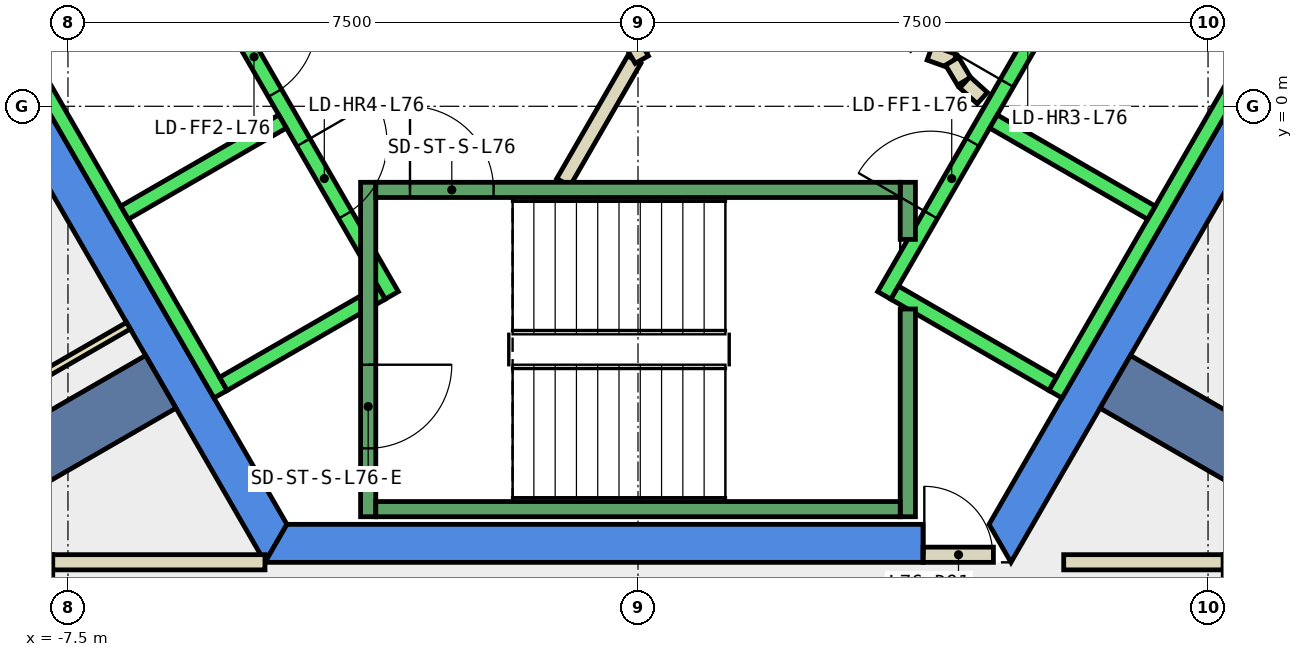
"""IFC4 building model, lengths in metres.
Left out: names, types, materials, properties, quantities, classifications, styles, units other than length and angle.
Written with IfcOpenShell. Run it as: python <this file> out.ifc"""

import sys

from ifc_helpers import new_model, si_unit, direction, frame, frame_2d, origin, place, context, subcontext, project, spatial, polyline, rectangle, outline, extrude, element, fill, save


model = new_model("IFC4")
c1 = context("Model", 3, precision=1e-05, world=origin(), true_north=direction((0.0, 1.0)))
c2 = subcontext(c1, "Body", "Model", "MODEL_VIEW")
j1 = project(units=[si_unit("LENGTHUNIT", "METRE"), si_unit("PLANEANGLEUNIT", "RADIAN")], contexts=[c1])
p1 = place(None, origin())
s1 = spatial("IfcSite", under=j1, at=p1, CompositionType="ELEMENT")
p2 = place(p1, origin())
s2 = spatial("IfcBuilding", under=s1, at=p2, CompositionType="ELEMENT")
p3 = place(p2, frame((0.0, 0.0, 322.4)))
s3 = spatial("IfcBuildingStorey", under=s2, at=p3, CompositionType="ELEMENT", Elevation=322.4)
p4 = place(p3, frame((0.0, 0.0, -0.34)))
e1 = element("IfcWall", 1, at=p4, inside=s3, PredefinedType="SHEAR", context=c2, shape_type="SweptSolid", body=[
    extrude(outline(polyline([(-9.815, 2.5), (-4.907, -6.0), (-4.619, -5.5), (-9.238, 2.5), (-9.815, 2.5)])), origin(), (0.0, 0.0, 1.0), 3.34),
])
p5 = place(p3, frame((0.0, 0.0, -0.34)))
e2 = element("IfcWall", 2, at=p5, inside=s3, PredefinedType="SHEAR", context=c2, shape_type="SweptSolid", body=[
    extrude(outline(polyline([(3.75, -6.0), (3.75, -5.5), (-4.619, -5.5), (-4.907, -6.0), (3.75, -6.0)])), origin(), (0.0, 0.0, 1.0), 3.34),
])
p6 = place(p3, frame((0.0, 0.0, -0.34)))
e3 = element("IfcWall", 3, at=p6, inside=s3, PredefinedType="SHEAR", context=c2, shape_type="SweptSolid", body=[
    extrude(outline(polyline([(4.907, -6.0), (9.815, 2.5), (9.238, 2.5), (4.619, -5.5), (4.907, -6.0)])), origin(), (0.0, 0.0, 1.0), 3.34),
])
for number, where, z_axis, x_axis in (
    (4, (6.279, -3.625, -0.34), (0.0, 0.0, 1.0), (0.866, -0.5, 0.0)),
    (5, (-6.279, -3.625, -0.34), (0.0, 0.0, 1.0), (-0.866, -0.5, 0.0)),
):
    element("IfcWall", number, at=place(p3, frame(where, z_axis=z_axis, x_axis=x_axis)), inside=s3, PredefinedType="SHEAR", context=c2, shape_type="SweptSolid", body=[
        extrude(rectangle(XDim=9.0, YDim=0.8, at=frame_2d((4.5, 0.0))), origin(), (0.0, 0.0, 1.0), 3.34),
    ])
p7 = place(p3, frame((-0.982, -1.0, 0.0), z_axis=(0.0, 0.0, 1.0), x_axis=(0.50024047865, 0.865886518847, 0.0)))
e6 = element("IfcWall", 6, at=p7, inside=s3, PredefinedType="PARTITIONING", context=c2, shape_type="SweptSolid", body=[
    extrude(rectangle(XDim=1.863, YDim=0.2, at=frame_2d((0.931, 0.0))), origin(), (0.0, 0.0, 1.0), 3.0),
])
p8 = place(p3, frame((3.838, 0.702, 0.0), z_axis=(0.0, 0.0, 1.0), x_axis=(0.941035081519, -0.338308993895, 0.0)))
e7 = element("IfcWall", 7, at=p8, inside=s3, PredefinedType="PARTITIONING", context=c2, shape_type="SweptSolid", body=[
    extrude(rectangle(XDim=0.337, YDim=0.2, at=frame_2d((0.168, 0.0))), origin(), (0.0, 0.0, 1.0), 3.0),
])
p9 = place(p3, frame((4.132, 0.593, 0.0), z_axis=(0.0, 0.0, 1.0), x_axis=(0.513561617048, -0.858052717201, 0.0)))
e8 = element("IfcWall", 8, at=p9, inside=s3, PredefinedType="PARTITIONING", context=c2, shape_type="SweptSolid", body=[
    extrude(rectangle(XDim=0.308, YDim=0.2, at=frame_2d((0.154, 0.0))), origin(), (0.0, 0.0, 1.0), 3.0),
])
p10 = place(p3, frame((4.301, 0.315, 0.0), z_axis=(0.0, 0.0, 1.0), x_axis=(0.741798017506, -0.670623367639, 0.0)))
e9 = element("IfcWall", 9, at=p10, inside=s3, PredefinedType="PARTITIONING", context=c2, shape_type="SweptSolid", body=[
    extrude(rectangle(XDim=0.309, YDim=0.2, at=frame_2d((0.154, 0.0))), origin(), (0.0, 0.0, 1.0), 3.0),
])
p11 = place(p3, frame((-2.54, 5.1, 0.0), z_axis=(0.0, 0.0, 1.0), x_axis=(0.499925051871, -0.866068670783, 0.0)))
e10 = element("IfcWall", 10, at=p11, inside=s3, PredefinedType="PARTITIONING", context=c2, shape_type="SweptSolid", body=[
    extrude(rectangle(XDim=5.181, YDim=0.2, at=frame_2d((2.59, 0.0))), origin(), (0.0, 0.0, 1.0), 3.0),
])
p12 = place(p11, frame((2.04, 0.0, 0.0)))
e11 = element("IfcOpeningElement", 11, at=p12, cuts=e10, PredefinedType="OPENING", context=c2, shape_type="SweptSolid", body=[
    extrude(rectangle(XDim=1.0, YDim=2.1, at=frame_2d((0.5, 1.05))), frame((0.0, 0.11, 0.0), z_axis=(0.0, -1.0, 0.0), x_axis=(1.0, 0.0, 0.0)), (0.0, 0.0, 1.0), 0.22),
])
p13 = place(p3, frame((5.601, -5.999, 0.0), z_axis=(0.0, 0.0, 1.0), x_axis=(1.0, 0.0, 0.0)))
e12 = element("IfcWall", 12, at=p13, inside=s3, PredefinedType="PARTITIONING", context=c2, shape_type="SweptSolid", body=[
    extrude(rectangle(XDim=2.099, YDim=0.2, at=frame_2d((1.049, 0.0))), origin(), (0.0, 0.0, 1.0), 3.0),
])
for number, where, z_axis, x_axis in (
    (13, (7.8, -5.899, 0.0), (0.0, 0.0, 1.0), (0.0, -1.0, 0.0)),
    (14, (-7.8, -11.624, 0.0), (0.0, 0.0, 1.0), (0.0, 1.0, 0.0)),
):
    element("IfcWall", number, at=place(p3, frame(where, z_axis=z_axis, x_axis=x_axis)), inside=s3, PredefinedType="PARTITIONING", context=c2, shape_type="SweptSolid", body=[
        extrude(rectangle(XDim=5.725, YDim=0.2, at=frame_2d((2.863, 0.0))), origin(), (0.0, 0.0, 1.0), 3.0),
    ])
p14 = place(p3, frame((-7.7, -5.999, 0.0), z_axis=(0.0, 0.0, 1.0), x_axis=(1.0, 0.0, 0.0)))
e15 = element("IfcWall", 15, at=p14, inside=s3, PredefinedType="PARTITIONING", context=c2, shape_type="SweptSolid", body=[
    extrude(rectangle(XDim=2.792, YDim=0.2, at=frame_2d((1.396, 0.0))), origin(), (0.0, 0.0, 1.0), 3.0),
])
p15 = place(p3, frame((-6.705, -2.887, 0.0), z_axis=(0.0, 0.0, 1.0), x_axis=(-0.866001397039, -0.500041578597, 0.0)))
e16 = element("IfcWall", 16, at=p15, inside=s3, PredefinedType="PARTITIONING", context=c2, shape_type="SweptSolid", body=[
    extrude(rectangle(XDim=6.998, YDim=0.1, at=frame_2d((3.499, 0.0))), origin(), (0.0, 0.0, 1.0), 3.0),
])
p16 = place(p3, frame((3.75, -5.9, 0.0), z_axis=(0.0, 0.0, 1.0), x_axis=(1.0, 0.0, 0.0)))
e17 = element("IfcWall", 17, at=p16, inside=s3, PredefinedType="PARTITIONING", context=c2, shape_type="SweptSolid", body=[
    extrude(rectangle(XDim=0.926, YDim=0.2, at=frame_2d((0.463, 0.0))), origin(), (0.0, 0.0, 1.0), 2.4),
])
p17 = place(p16, frame((0.017, 0.0, 0.0)))
e18 = element("IfcOpeningElement", 18, at=p17, cuts=e17, PredefinedType="OPENING", context=c2, shape_type="SweptSolid", body=[
    extrude(rectangle(XDim=0.9, YDim=2.1, at=frame_2d((0.45, 1.05))), frame((0.0, 0.11, 0.0), z_axis=(0.0, -1.0, 0.0), x_axis=(1.0, 0.0, 0.0)), (0.0, 0.0, 1.0), 0.22),
])
p18 = place(p3, frame((-5.94, 2.188, 0.0), z_axis=(0.0, 0.0, 1.0), x_axis=(0.500034260056, -0.866005622828, 0.0)))
e19 = element("IfcWall", 19, at=p18, inside=s3, PredefinedType="STANDARD", context=c2, shape_type="SweptSolid", body=[
    extrude(rectangle(XDim=5.399, YDim=0.2, at=frame_2d((2.7, 0.0))), origin(), (0.0, 0.0, 1.0), 3.0),
])
p19 = place(p18, frame((3.075, 0.0, 0.0)))
e20 = element("IfcOpeningElement", 20, at=p19, cuts=e19, PredefinedType="OPENING", context=c2, shape_type="SweptSolid", body=[
    extrude(rectangle(XDim=1.1, YDim=2.1, at=frame_2d((0.55, 1.05))), frame((0.0, 0.11, 0.0), z_axis=(0.0, -1.0, 0.0), x_axis=(1.0, 0.0, 0.0)), (0.0, 0.0, 1.0), 0.22),
])
p20 = place(p18, frame((1.225, 0.0, 0.0)))
e21 = element("IfcOpeningElement", 21, at=p20, cuts=e19, PredefinedType="OPENING", context=c2, shape_type="SweptSolid", body=[
    extrude(rectangle(XDim=1.1, YDim=2.1, at=frame_2d((0.55, 1.05))), frame((0.0, 0.11, 0.0), z_axis=(0.0, -1.0, 0.0), x_axis=(1.0, 0.0, 0.0)), (0.0, 0.0, 1.0), 0.22),
])
p21 = place(p3, frame((-8.192, 0.888, 0.0), z_axis=(0.0, 0.0, 1.0), x_axis=(0.500034260056, -0.866005622828, 0.0)))
e22 = element("IfcWall", 22, at=p21, inside=s3, PredefinedType="STANDARD", context=c2, shape_type="SweptSolid", body=[
    extrude(rectangle(XDim=5.399, YDim=0.2, at=frame_2d((2.7, 0.0))), origin(), (0.0, 0.0, 1.0), 3.0),
])
p22 = place(p3, frame((-4.677, -0.2, 0.0), z_axis=(0.0, 0.0, 1.0), x_axis=(-0.865973769406, -0.500089422704, 0.0)))
e23 = element("IfcWall", 23, at=p22, inside=s3, PredefinedType="STANDARD", context=c2, shape_type="SweptSolid", body=[
    extrude(rectangle(XDim=2.399, YDim=0.2, at=frame_2d((1.2, 0.0))), origin(), (0.0, 0.0, 1.0), 3.0),
])
p23 = place(p3, frame((-3.377, -2.452, 0.0), z_axis=(0.0, 0.0, 1.0), x_axis=(-0.865955154139, -0.50012165622, 0.0)))
e24 = element("IfcWall", 24, at=p23, inside=s3, PredefinedType="STANDARD", context=c2, shape_type="SweptSolid", body=[
    extrude(rectangle(XDim=2.4, YDim=0.2, at=frame_2d((1.2, 0.0))), origin(), (0.0, 0.0, 1.0), 3.0),
])
p24 = place(p3, frame((3.24, -2.488, 0.0), z_axis=(0.0, 0.0, 1.0), x_axis=(0.500034260056, 0.866005622828, 0.0)))
e25 = element("IfcWall", 25, at=p24, inside=s3, PredefinedType="STANDARD", context=c2, shape_type="SweptSolid", body=[
    extrude(rectangle(XDim=5.399, YDim=0.2, at=frame_2d((2.7, 0.0))), origin(), (0.0, 0.0, 1.0), 3.0),
])
p25 = place(p24, frame((3.225, 0.0, 0.0)))
e26 = element("IfcOpeningElement", 26, at=p25, cuts=e25, PredefinedType="OPENING", context=c2, shape_type="SweptSolid", body=[
    extrude(rectangle(XDim=1.1, YDim=2.1, at=frame_2d((0.55, 1.05))), frame((0.0, 0.11, 0.0), z_axis=(0.0, -1.0, 0.0), x_axis=(1.0, 0.0, 0.0)), (0.0, 0.0, 1.0), 0.22),
])
p26 = place(p24, frame((1.225, 0.0, 0.0)))
e27 = element("IfcOpeningElement", 27, at=p26, cuts=e25, PredefinedType="OPENING", context=c2, shape_type="SweptSolid", body=[
    extrude(rectangle(XDim=1.1, YDim=2.1, at=frame_2d((0.55, 1.05))), frame((0.0, 0.11, 0.0), z_axis=(0.0, -1.0, 0.0), x_axis=(1.0, 0.0, 0.0)), (0.0, 0.0, 1.0), 0.22),
])
p27 = place(p3, frame((5.492, -3.788, 0.0), z_axis=(0.0, 0.0, 1.0), x_axis=(0.500034260056, 0.866005622828, 0.0)))
e28 = element("IfcWall", 28, at=p27, inside=s3, PredefinedType="STANDARD", context=c2, shape_type="SweptSolid", body=[
    extrude(rectangle(XDim=5.399, YDim=0.2, at=frame_2d((2.7, 0.0))), origin(), (0.0, 0.0, 1.0), 3.0),
])
p28 = place(p3, frame((3.377, -2.452, 0.0), z_axis=(0.0, 0.0, 1.0), x_axis=(0.865955154139, -0.50012165622, 0.0)))
e29 = element("IfcWall", 29, at=p28, inside=s3, PredefinedType="STANDARD", context=c2, shape_type="SweptSolid", body=[
    extrude(rectangle(XDim=2.4, YDim=0.2, at=frame_2d((1.2, 0.0))), origin(), (0.0, 0.0, 1.0), 3.0),
])
p29 = place(p3, frame((4.677, -0.2, 0.0), z_axis=(0.0, 0.0, 1.0), x_axis=(0.865973769406, -0.500089422704, 0.0)))
e30 = element("IfcWall", 30, at=p29, inside=s3, PredefinedType="STANDARD", context=c2, shape_type="SweptSolid", body=[
    extrude(rectangle(XDim=2.399, YDim=0.2, at=frame_2d((1.2, 0.0))), origin(), (0.0, 0.0, 1.0), 3.0),
])
p30 = place(p3, frame((-3.55, -1.0, 0.0), z_axis=(0.0, 0.0, 1.0), x_axis=(0.0, -1.0, 0.0)))
e31 = element("IfcWall", 31, at=p30, inside=s3, PredefinedType="STANDARD", context=c2, shape_type="SweptSolid", body=[
    extrude(rectangle(XDim=4.4, YDim=0.2, at=frame_2d((2.2, 0.0))), origin(), (0.0, 0.0, 1.0), 3.0),
])
p31 = place(p30, frame((2.4, 0.0, 0.0)))
e32 = element("IfcOpeningElement", 32, at=p31, cuts=e31, PredefinedType="OPENING", context=c2, shape_type="SweptSolid", body=[
    extrude(rectangle(XDim=1.1, YDim=2.2, at=frame_2d((0.55, 1.1))), frame((0.0, 0.11, 0.0), z_axis=(0.0, -1.0, 0.0), x_axis=(1.0, 0.0, 0.0)), (0.0, 0.0, 1.0), 0.22),
])
p32 = place(p3, frame((3.55, -2.667, 0.0), z_axis=(0.0, 0.0, 1.0), x_axis=(0.0, -1.0, 0.0)))
e33 = element("IfcWall", 33, at=p32, inside=s3, PredefinedType="STANDARD", context=c2, shape_type="SweptSolid", body=[
    extrude(rectangle(XDim=2.733, YDim=0.2, at=frame_2d((1.366, 0.0))), origin(), (0.0, 0.0, 1.0), 3.0),
])
p33 = place(p3, frame((3.55, -1.0, 0.0), z_axis=(0.0, 0.0, 1.0), x_axis=(0.0, -1.0, 0.0)))
e34 = element("IfcWall", 34, at=p33, inside=s3, PredefinedType="STANDARD", context=c2, shape_type="SweptSolid", body=[
    extrude(rectangle(XDim=0.751, YDim=0.2, at=frame_2d((0.375, 0.0))), origin(), (0.0, 0.0, 1.0), 3.0),
])
p34 = place(p3, frame((-3.45, -1.1, 0.0), z_axis=(0.0, 0.0, 1.0), x_axis=(1.0, 0.0, 0.0)))
e35 = element("IfcWall", 35, at=p34, inside=s3, PredefinedType="STANDARD", context=c2, shape_type="SweptSolid", body=[
    extrude(rectangle(XDim=6.9, YDim=0.2, at=frame_2d((3.45, 0.0))), origin(), (0.0, 0.0, 1.0), 3.0),
])
p35 = place(p34, frame((0.45, 0.0, 0.0)))
e36 = element("IfcOpeningElement", 36, at=p35, cuts=e35, PredefinedType="OPENING", context=c2, shape_type="SweptSolid", body=[
    extrude(rectangle(XDim=1.1, YDim=2.2, at=frame_2d((0.55, 1.1))), frame((0.0, 0.11, 0.0), z_axis=(0.0, -1.0, 0.0), x_axis=(1.0, 0.0, 0.0)), (0.0, 0.0, 1.0), 0.22),
])
p36 = place(p3, frame((-3.45, -5.3, 0.0), z_axis=(0.0, 0.0, 1.0), x_axis=(1.0, 0.0, 0.0)))
e37 = element("IfcWall", 37, at=p36, inside=s3, PredefinedType="STANDARD", context=c2, shape_type="SweptSolid", body=[
    extrude(rectangle(XDim=6.9, YDim=0.2, at=frame_2d((3.45, 0.0))), origin(), (0.0, 0.0, 1.0), 3.0),
])
p37 = place(p17, origin())
e38 = element("IfcDoor", 38, at=p37, inside=s3, OperationType="SINGLE_SWING_LEFT", PredefinedType="DOOR", context=c2, shape_type="SweptSolid", body=[
    extrude(rectangle(XDim=0.9, YDim=2.1, at=frame_2d((0.45, 1.05))), frame((0.0, 0.025, 0.0), z_axis=(0.0, -1.0, 0.0), x_axis=(1.0, 0.0, 0.0)), (0.0, 0.0, 1.0), 0.05),
])
fill(e18, e38)
p38 = place(p25, origin())
e39 = element("IfcDoor", 39, at=p38, inside=s3, OperationType="SLIDING_TO_LEFT", PredefinedType="DOOR", context=c2, shape_type="SweptSolid", body=[
    extrude(rectangle(XDim=1.1, YDim=2.1, at=frame_2d((0.55, 1.05))), frame((0.0, 0.025, 0.0), z_axis=(0.0, -1.0, 0.0), x_axis=(1.0, 0.0, 0.0)), (0.0, 0.0, 1.0), 0.05),
])
fill(e26, e39)
p39 = place(p19, origin())
e40 = element("IfcDoor", 40, at=p39, inside=s3, OperationType="SLIDING_TO_LEFT", PredefinedType="DOOR", context=c2, shape_type="SweptSolid", body=[
    extrude(rectangle(XDim=1.1, YDim=2.1, at=frame_2d((0.55, 1.05))), frame((0.0, 0.025, 0.0), z_axis=(0.0, -1.0, 0.0), x_axis=(1.0, 0.0, 0.0)), (0.0, 0.0, 1.0), 0.05),
])
fill(e20, e40)
p40 = place(p26, origin())
e41 = element("IfcDoor", 41, at=p40, inside=s3, OperationType="SLIDING_TO_LEFT", PredefinedType="DOOR", context=c2, shape_type="SweptSolid", body=[
    extrude(rectangle(XDim=1.1, YDim=2.1, at=frame_2d((0.55, 1.05))), frame((0.0, 0.025, 0.0), z_axis=(0.0, -1.0, 0.0), x_axis=(1.0, 0.0, 0.0)), (0.0, 0.0, 1.0), 0.05),
])
fill(e27, e41)
p41 = place(p20, origin())
e42 = element("IfcDoor", 42, at=p41, inside=s3, OperationType="SLIDING_TO_LEFT", PredefinedType="DOOR", context=c2, shape_type="SweptSolid", body=[
    extrude(rectangle(XDim=1.1, YDim=2.1, at=frame_2d((0.55, 1.05))), frame((0.0, 0.025, 0.0), z_axis=(0.0, -1.0, 0.0), x_axis=(1.0, 0.0, 0.0)), (0.0, 0.0, 1.0), 0.05),
])
fill(e21, e42)
p42 = place(p35, origin())
e43 = element("IfcDoor", 43, at=p42, inside=s3, OperationType="SINGLE_SWING_LEFT", PredefinedType="DOOR", context=c2, shape_type="SweptSolid", body=[
    extrude(rectangle(XDim=1.1, YDim=2.2, at=frame_2d((0.55, 1.1))), frame((0.0, 0.025, 0.0), z_axis=(0.0, -1.0, 0.0), x_axis=(1.0, 0.0, 0.0)), (0.0, 0.0, 1.0), 0.05),
])
fill(e36, e43)
p43 = place(p31, origin())
e44 = element("IfcDoor", 44, at=p43, inside=s3, OperationType="SINGLE_SWING_LEFT", PredefinedType="DOOR", context=c2, shape_type="SweptSolid", body=[
    extrude(rectangle(XDim=1.1, YDim=2.2, at=frame_2d((0.55, 1.1))), frame((0.0, 0.025, 0.0), z_axis=(0.0, -1.0, 0.0), x_axis=(1.0, 0.0, 0.0)), (0.0, 0.0, 1.0), 0.05),
])
fill(e32, e44)
save(model, sys.argv[1])
